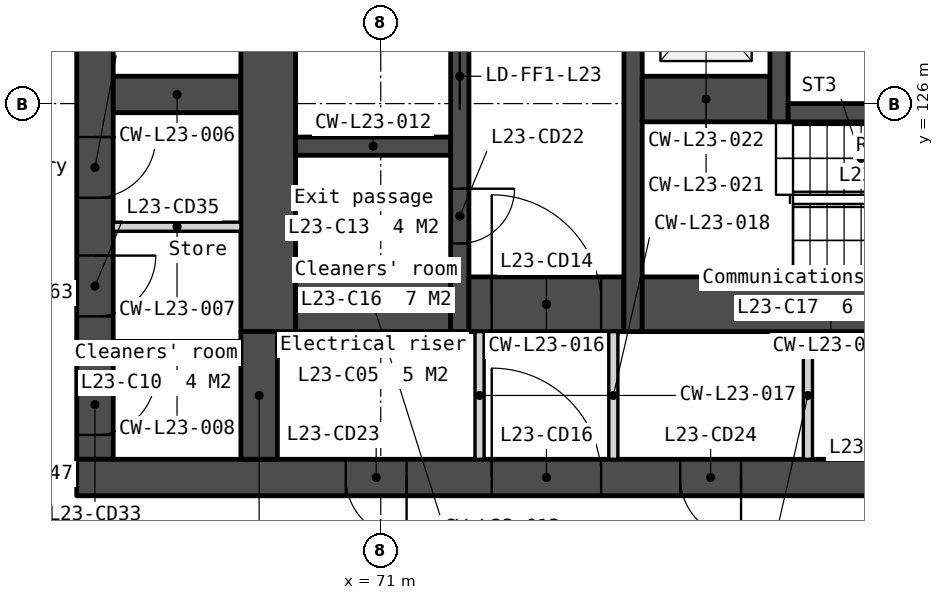
"""IFC4 building model, lengths in metres.
Left out: names, types, materials, properties, quantities, classifications, styles, units other than length and angle.
Written with IfcOpenShell. Run it as: python <this file> out.ifc"""

import sys

from ifc_helpers import new_model, si_unit, direction, frame, frame_2d, origin, place, context, subcontext, project, spatial, polyline, rectangle, outline, extrude, element, fill, save


model = new_model("IFC4")
c1 = context("Model", 3, precision=1e-05, world=origin(), true_north=direction((0.0, 1.0)))
c2 = subcontext(c1, "Body", "Model", "MODEL_VIEW")
j1 = project(units=[si_unit("LENGTHUNIT", "METRE"), si_unit("PLANEANGLEUNIT", "RADIAN")], contexts=[c1])
p1 = place(None, origin())
s1 = spatial("IfcSite", under=j1, at=p1, CompositionType="ELEMENT")
p2 = place(p1, origin())
s2 = spatial("IfcBuilding", under=s1, at=p2, CompositionType="ELEMENT")
p3 = place(p2, frame((0.0, 0.0, 95.8)))
s3 = spatial("IfcBuildingStorey", under=s2, at=p3, CompositionType="ELEMENT", Elevation=95.8)
p4 = place(p3, frame((66.3, 133.95, 0.0), z_axis=(0.0, 0.0, 1.0), x_axis=(0.0, -1.0, 0.0)))
e1 = element("IfcWall", 1, at=p4, inside=s3, PredefinedType="SOLIDWALL", context=c2, shape_type="SweptSolid", body=[
    extrude(rectangle(XDim=13.8, YDim=0.6, at=frame_2d((6.9, 0.0))), origin(), (0.0, 0.0, 1.0), 3.35),
])
p5 = place(p4, frame((0.6, 0.0, 0.0)))
e2 = element("IfcOpeningElement", 2, at=p5, cuts=e1, PredefinedType="OPENING", context=c2, shape_type="SweptSolid", body=[
    extrude(rectangle(XDim=1.1, YDim=2.1, at=frame_2d((0.55, 1.05))), frame((0.0, 0.31, 0.0), z_axis=(0.0, -1.0, 0.0), x_axis=(1.0, 0.0, 0.0)), (0.0, 0.0, 1.0), 0.62),
])
p6 = place(p4, frame((12.4, 0.0, 0.0)))
e3 = element("IfcOpeningElement", 3, at=p6, cuts=e1, PredefinedType="OPENING", context=c2, shape_type="SweptSolid", body=[
    extrude(rectangle(XDim=1.0, YDim=2.1, at=frame_2d((0.5, 1.05))), frame((0.0, 0.31, 0.0), z_axis=(0.0, -1.0, 0.0), x_axis=(1.0, 0.0, 0.0)), (0.0, 0.0, 1.0), 0.62),
])
p7 = place(p4, frame((8.5, 0.0, 0.0)))
e4 = element("IfcOpeningElement", 4, at=p7, cuts=e1, PredefinedType="OPENING", context=c2, shape_type="SweptSolid", body=[
    extrude(rectangle(XDim=1.0, YDim=2.1, at=frame_2d((0.5, 1.05))), frame((0.0, 0.31, 0.0), z_axis=(0.0, -1.0, 0.0), x_axis=(1.0, 0.0, 0.0)), (0.0, 0.0, 1.0), 0.62),
])
p8 = place(p4, frame((10.45, 0.0, 0.0)))
e5 = element("IfcOpeningElement", 5, at=p8, cuts=e1, PredefinedType="OPENING", context=c2, shape_type="SweptSolid", body=[
    extrude(rectangle(XDim=1.0, YDim=2.1, at=frame_2d((0.5, 1.05))), frame((0.0, 0.31, 0.0), z_axis=(0.0, -1.0, 0.0), x_axis=(1.0, 0.0, 0.0)), (0.0, 0.0, 1.0), 0.62),
])
p9 = place(p3, frame((66.0, 119.85, 0.0), z_axis=(0.0, 0.0, 1.0), x_axis=(1.0, 0.0, 0.0)))
e6 = element("IfcWall", 6, at=p9, inside=s3, PredefinedType="SOLIDWALL", context=c2, shape_type="SweptSolid", body=[
    extrude(rectangle(XDim=28.0, YDim=0.6, at=frame_2d((14.0, 0.0))), origin(), (0.0, 0.0, 1.0), 3.35),
])
p10 = place(p9, frame((6.825, 0.0, 0.0)))
e7 = element("IfcOpeningElement", 7, at=p10, cuts=e6, PredefinedType="OPENING", context=c2, shape_type="SweptSolid", body=[
    extrude(rectangle(XDim=1.8, YDim=2.1, at=frame_2d((0.9, 1.05))), frame((0.0, 0.31, 0.0), z_axis=(0.0, -1.0, 0.0), x_axis=(1.0, 0.0, 0.0)), (0.0, 0.0, 1.0), 0.62),
])
p11 = place(p9, frame((15.85, 0.0, 0.0)))
e8 = element("IfcOpeningElement", 8, at=p11, cuts=e6, PredefinedType="OPENING", context=c2, shape_type="SweptSolid", body=[
    extrude(rectangle(XDim=1.5, YDim=2.1, at=frame_2d((0.75, 1.05))), frame((0.0, 0.31, 0.0), z_axis=(0.0, -1.0, 0.0), x_axis=(1.0, 0.0, 0.0)), (0.0, 0.0, 1.0), 0.62),
])
p12 = place(p9, frame((19.375, 0.0, 0.0)))
e9 = element("IfcOpeningElement", 9, at=p12, cuts=e6, PredefinedType="OPENING", context=c2, shape_type="SweptSolid", body=[
    extrude(rectangle(XDim=1.8, YDim=2.1, at=frame_2d((0.9, 1.05))), frame((0.0, 0.31, 0.0), z_axis=(0.0, -1.0, 0.0), x_axis=(1.0, 0.0, 0.0)), (0.0, 0.0, 1.0), 0.62),
])
p13 = place(p9, frame((4.425, 0.0, 0.0)))
e10 = element("IfcOpeningElement", 10, at=p13, cuts=e6, PredefinedType="OPENING", context=c2, shape_type="SweptSolid", body=[
    extrude(rectangle(XDim=1.0, YDim=2.1, at=frame_2d((0.5, 1.05))), frame((0.0, 0.31, 0.0), z_axis=(0.0, -1.0, 0.0), x_axis=(1.0, 0.0, 0.0)), (0.0, 0.0, 1.0), 0.62),
])
p14 = place(p9, frame((9.925, 0.0, 0.0)))
e11 = element("IfcOpeningElement", 11, at=p14, cuts=e6, PredefinedType="OPENING", context=c2, shape_type="SweptSolid", body=[
    extrude(rectangle(XDim=1.0, YDim=2.1, at=frame_2d((0.5, 1.05))), frame((0.0, 0.31, 0.0), z_axis=(0.0, -1.0, 0.0), x_axis=(1.0, 0.0, 0.0)), (0.0, 0.0, 1.0), 0.62),
])
p15 = place(p9, frame((13.125, 0.0, 0.0)))
e12 = element("IfcOpeningElement", 12, at=p15, cuts=e6, PredefinedType="OPENING", context=c2, shape_type="SweptSolid", body=[
    extrude(rectangle(XDim=1.0, YDim=2.1, at=frame_2d((0.5, 1.05))), frame((0.0, 0.31, 0.0), z_axis=(0.0, -1.0, 0.0), x_axis=(1.0, 0.0, 0.0)), (0.0, 0.0, 1.0), 0.62),
])
p16 = place(p9, frame((21.725, 0.0, 0.0)))
e13 = element("IfcOpeningElement", 13, at=p16, cuts=e6, PredefinedType="OPENING", context=c2, shape_type="SweptSolid", body=[
    extrude(rectangle(XDim=1.0, YDim=2.1, at=frame_2d((0.5, 1.05))), frame((0.0, 0.31, 0.0), z_axis=(0.0, -1.0, 0.0), x_axis=(1.0, 0.0, 0.0)), (0.0, 0.0, 1.0), 0.62),
])
p17 = place(p9, frame((23.425, 0.0, 0.0)))
e14 = element("IfcOpeningElement", 14, at=p17, cuts=e6, PredefinedType="OPENING", context=c2, shape_type="SweptSolid", body=[
    extrude(rectangle(XDim=1.0, YDim=2.1, at=frame_2d((0.5, 1.05))), frame((0.0, 0.31, 0.0), z_axis=(0.0, -1.0, 0.0), x_axis=(1.0, 0.0, 0.0)), (0.0, 0.0, 1.0), 0.62),
])
p18 = place(p3, frame((66.6, 126.15, 0.0), z_axis=(0.0, 0.0, 1.0), x_axis=(1.0, 0.0, 0.0)))
e15 = element("IfcWall", 15, at=p18, inside=s3, PredefinedType="SOLIDWALL", context=c2, shape_type="SweptSolid", body=[
    extrude(rectangle(XDim=2.1, YDim=0.6, at=frame_2d((1.05, 0.0))), origin(), (0.0, 0.0, 1.0), 3.35),
])
for number, where, z_axis, x_axis in (
    (16, (66.6, 123.975, 0.0), (0.0, 0.0, 1.0), (1.0, 0.0, 0.0)),
    (17, (66.6, 122.025, 0.0), (0.0, 0.0, 1.0), (1.0, 0.0, 0.0)),
):
    element("IfcWall", number, at=place(p3, frame(where, z_axis=z_axis, x_axis=x_axis)), inside=s3, PredefinedType="PARTITIONING", context=c2, shape_type="SweptSolid", body=[
        extrude(rectangle(XDim=2.1, YDim=0.15, at=frame_2d((1.05, 0.0))), origin(), (0.0, 0.0, 1.0), 3.35),
    ])
p19 = place(p3, frame((69.15, 133.95, 0.0), z_axis=(0.0, 0.0, 1.0), x_axis=(0.0, -1.0, 0.0)))
e18 = element("IfcWall", 18, at=p19, inside=s3, PredefinedType="SOLIDWALL", context=c2, shape_type="SweptSolid", body=[
    extrude(rectangle(XDim=11.7, YDim=0.9, at=frame_2d((5.85, 0.0))), origin(), (0.0, 0.0, 1.0), 3.35),
])
p20 = place(p3, frame((69.0, 122.25, 0.0), z_axis=(0.0, 0.0, 1.0), x_axis=(0.0, -1.0, 0.0)))
e19 = element("IfcWall", 19, at=p20, inside=s3, PredefinedType="SOLIDWALL", context=c2, shape_type="SweptSolid", body=[
    extrude(rectangle(XDim=2.1, YDim=0.6, at=frame_2d((1.05, 0.0))), origin(), (0.0, 0.0, 1.0), 3.35),
])
p21 = place(p3, frame((69.6, 125.3, 0.0), z_axis=(0.0, 0.0, 1.0), x_axis=(1.0, 0.0, 0.0)))
e20 = element("IfcWall", 20, at=p21, inside=s3, PredefinedType="SOLIDWALL", context=c2, shape_type="SweptSolid", body=[
    extrude(rectangle(XDim=2.55, YDim=0.3, at=frame_2d((1.275, 0.0))), origin(), (0.0, 0.0, 1.0), 3.35),
])
p22 = place(p3, frame((69.6, 122.7, 0.0), z_axis=(0.0, 0.0, 1.0), x_axis=(1.0, 0.0, 0.0)))
e21 = element("IfcWall", 21, at=p22, inside=s3, PredefinedType="SOLIDWALL", context=c2, shape_type="SweptSolid", body=[
    extrude(rectangle(XDim=2.55, YDim=0.9, at=frame_2d((1.275, 0.0))), origin(), (0.0, 0.0, 1.0), 3.35),
])
p23 = place(p3, frame((72.3, 133.95, 0.0), z_axis=(0.0, 0.0, 1.0), x_axis=(0.0, -1.0, 0.0)))
e22 = element("IfcWall", 22, at=p23, inside=s3, PredefinedType="SOLIDWALL", context=c2, shape_type="SweptSolid", body=[
    extrude(rectangle(XDim=11.7, YDim=0.3, at=frame_2d((5.85, 0.0))), origin(), (0.0, 0.0, 1.0), 3.35),
])
p24 = place(p23, frame((6.95, 0.0, 0.0)))
e23 = element("IfcOpeningElement", 23, at=p24, cuts=e22, PredefinedType="OPENING", context=c2, shape_type="SweptSolid", body=[
    extrude(rectangle(XDim=1.1, YDim=2.1, at=frame_2d((0.55, 1.05))), frame((0.0, 0.16, 0.0), z_axis=(0.0, -1.0, 0.0), x_axis=(1.0, 0.0, 0.0)), (0.0, 0.0, 1.0), 0.32),
])
p25 = place(p23, frame((9.35, 0.0, 0.0)))
e24 = element("IfcOpeningElement", 24, at=p25, cuts=e22, PredefinedType="OPENING", context=c2, shape_type="SweptSolid", body=[
    extrude(rectangle(XDim=0.9, YDim=2.1, at=frame_2d((0.45, 1.05))), frame((0.0, 0.16, 0.0), z_axis=(0.0, -1.0, 0.0), x_axis=(1.0, 0.0, 0.0)), (0.0, 0.0, 1.0), 0.32),
])
p26 = place(p23, frame((5.1, 0.0, 0.0)))
e25 = element("IfcOpeningElement", 25, at=p26, cuts=e22, PredefinedType="OPENING", context=c2, shape_type="SweptSolid", body=[
    extrude(rectangle(XDim=1.0, YDim=2.1, at=frame_2d((0.5, 1.05))), frame((0.0, 0.16, 0.0), z_axis=(0.0, -1.0, 0.0), x_axis=(1.0, 0.0, 0.0)), (0.0, 0.0, 1.0), 0.32),
])
p27 = place(p3, frame((72.45, 122.7, 0.0), z_axis=(0.0, 0.0, 1.0), x_axis=(1.0, 0.0, 0.0)))
e26 = element("IfcWall", 26, at=p27, inside=s3, PredefinedType="SOLIDWALL", context=c2, shape_type="SweptSolid", body=[
    extrude(rectangle(XDim=2.55, YDim=0.9, at=frame_2d((1.275, 0.0))), origin(), (0.0, 0.0, 1.0), 3.35),
])
p28 = place(p27, frame((0.375, 0.0, 0.0)))
e27 = element("IfcOpeningElement", 27, at=p28, cuts=e26, PredefinedType="OPENING", context=c2, shape_type="SweptSolid", body=[
    extrude(rectangle(XDim=1.8, YDim=2.1, at=frame_2d((0.9, 1.05))), frame((0.0, 0.46, 0.0), z_axis=(0.0, -1.0, 0.0), x_axis=(1.0, 0.0, 0.0)), (0.0, 0.0, 1.0), 0.92),
])
for number, where, z_axis, x_axis in (
    (28, (72.625, 122.25, 0.0), (0.0, 0.0, 1.0), (0.0, -1.0, 0.0)),
    (29, (74.825, 122.25, 0.0), (0.0, 0.0, 1.0), (0.0, -1.0, 0.0)),
):
    element("IfcWall", number, at=place(p3, frame(where, z_axis=z_axis, x_axis=x_axis)), inside=s3, PredefinedType="PARTITIONING", context=c2, shape_type="SweptSolid", body=[
        extrude(rectangle(XDim=2.1, YDim=0.15, at=frame_2d((1.05, 0.0))), origin(), (0.0, 0.0, 1.0), 3.35),
    ])
p29 = place(p3, frame((75.15, 133.95, 0.0), z_axis=(0.0, 0.0, 1.0), x_axis=(0.0, -1.0, 0.0)))
e30 = element("IfcWall", 30, at=p29, inside=s3, PredefinedType="SOLIDWALL", context=c2, shape_type="SweptSolid", body=[
    extrude(rectangle(XDim=11.7, YDim=0.3, at=frame_2d((5.85, 0.0))), origin(), (0.0, 0.0, 1.0), 3.35),
])
p30 = place(p3, frame((75.3, 126.075, 0.0), z_axis=(0.0, 0.0, 1.0), x_axis=(1.0, 0.0, 0.0)))
e31 = element("IfcWall", 31, at=p30, inside=s3, PredefinedType="SOLIDWALL", context=c2, shape_type="SweptSolid", body=[
    extrude(rectangle(XDim=2.1, YDim=0.75, at=frame_2d((1.05, 0.0))), origin(), (0.0, 0.0, 1.0), 3.35),
])
p31 = place(p3, frame((75.3, 122.7, 0.0), z_axis=(0.0, 0.0, 1.0), x_axis=(1.0, 0.0, 0.0)))
e32 = element("IfcWall", 32, at=p31, inside=s3, PredefinedType="SOLIDWALL", context=c2, shape_type="SweptSolid", body=[
    extrude(rectangle(XDim=6.2, YDim=0.9, at=frame_2d((3.1, 0.0))), origin(), (0.0, 0.0, 1.0), 3.35),
])
p32 = place(p3, frame((77.55, 133.95, 0.0), z_axis=(0.0, 0.0, 1.0), x_axis=(0.0, -1.0, 0.0)))
e33 = element("IfcWall", 33, at=p32, inside=s3, PredefinedType="SOLIDWALL", context=c2, shape_type="SweptSolid", body=[
    extrude(rectangle(XDim=8.25, YDim=0.3, at=frame_2d((4.125, 0.0))), origin(), (0.0, 0.0, 1.0), 3.35),
])
p33 = place(p32, frame((0.6, 0.0, 0.0)))
e34 = element("IfcOpeningElement", 34, at=p33, cuts=e33, PredefinedType="OPENING", context=c2, shape_type="SweptSolid", body=[
    extrude(rectangle(XDim=1.1, YDim=2.1, at=frame_2d((0.55, 1.05))), frame((0.0, 0.16, 0.0), z_axis=(0.0, -1.0, 0.0), x_axis=(1.0, 0.0, 0.0)), (0.0, 0.0, 1.0), 0.32),
])
p34 = place(p32, frame((3.2, 0.0, 0.0)))
e35 = element("IfcOpeningElement", 35, at=p34, cuts=e33, PredefinedType="OPENING", context=c2, shape_type="SweptSolid", body=[
    extrude(rectangle(XDim=1.1, YDim=2.1, at=frame_2d((0.55, 1.05))), frame((0.0, 0.16, 0.0), z_axis=(0.0, -1.0, 0.0), x_axis=(1.0, 0.0, 0.0)), (0.0, 0.0, 1.0), 0.32),
])
p35 = place(p32, frame((5.8, 0.0, 0.0)))
e36 = element("IfcOpeningElement", 36, at=p35, cuts=e33, PredefinedType="OPENING", context=c2, shape_type="SweptSolid", body=[
    extrude(rectangle(XDim=1.1, YDim=2.1, at=frame_2d((0.55, 1.05))), frame((0.0, 0.16, 0.0), z_axis=(0.0, -1.0, 0.0), x_axis=(1.0, 0.0, 0.0)), (0.0, 0.0, 1.0), 0.32),
])
p36 = place(p3, frame((77.7, 125.85, 0.0), z_axis=(0.0, 0.0, 1.0), x_axis=(1.0, 0.0, 0.0)))
e37 = element("IfcWall", 37, at=p36, inside=s3, PredefinedType="SOLIDWALL", context=c2, shape_type="SweptSolid", body=[
    extrude(rectangle(XDim=4.6, YDim=0.3, at=frame_2d((2.3, 0.0))), origin(), (0.0, 0.0, 1.0), 3.35),
])
p37 = place(p3, frame((78.025, 122.25, 0.0), z_axis=(0.0, 0.0, 1.0), x_axis=(0.0, -1.0, 0.0)))
e38 = element("IfcWall", 38, at=p37, inside=s3, PredefinedType="PARTITIONING", context=c2, shape_type="SweptSolid", body=[
    extrude(rectangle(XDim=2.1, YDim=0.15, at=frame_2d((1.05, 0.0))), origin(), (0.0, 0.0, 1.0), 3.35),
])
p38 = place(p3, frame((56.073, 130.263, -0.15), z_axis=(0.0, 0.0, 1.0), x_axis=(0.500000478905, -0.866025127289, 0.0)))
e39 = element("IfcWall", 39, at=p38, inside=s3, PredefinedType="SOLIDWALL", context=c2, shape_type="SweptSolid", body=[
    extrude(outline(polyline([(42.643, 0.0), (42.643, 3.5), (0.0, 3.5), (0.0, 0.0), (42.643, 0.0)])), frame((0.0, 0.225, 0.0), z_axis=(0.0, -1.0, 0.0), x_axis=(1.0, 0.0, 0.0)), (0.0, 0.0, 1.0), 0.45),
])
p39 = place(p38, frame((2.814, 0.0, 1.05)))
e40 = element("IfcOpeningElement", 40, at=p39, cuts=e39, PredefinedType="OPENING", context=c2, shape_type="SweptSolid", body=[
    extrude(rectangle(XDim=1.2, YDim=1.5, at=frame_2d((0.6, 0.75))), frame((0.0, 0.235, 0.0), z_axis=(0.0, -1.0, 0.0), x_axis=(1.0, 0.0, 0.0)), (0.0, 0.0, 1.0), 0.47),
])
p40 = place(p38, frame((4.514, 0.0, 1.05)))
e41 = element("IfcOpeningElement", 41, at=p40, cuts=e39, PredefinedType="OPENING", context=c2, shape_type="SweptSolid", body=[
    extrude(rectangle(XDim=1.2, YDim=1.5, at=frame_2d((0.6, 0.75))), frame((0.0, 0.235, 0.0), z_axis=(0.0, -1.0, 0.0), x_axis=(1.0, 0.0, 0.0)), (0.0, 0.0, 1.0), 0.47),
])
p41 = place(p38, frame((11.343, 0.0, 1.05)))
e42 = element("IfcOpeningElement", 42, at=p41, cuts=e39, PredefinedType="OPENING", context=c2, shape_type="SweptSolid", body=[
    extrude(rectangle(XDim=1.2, YDim=1.5, at=frame_2d((0.6, 0.75))), frame((0.0, 0.235, 0.0), z_axis=(0.0, -1.0, 0.0), x_axis=(1.0, 0.0, 0.0)), (0.0, 0.0, 1.0), 0.47),
])
p42 = place(p38, frame((13.043, 0.0, 1.05)))
e43 = element("IfcOpeningElement", 43, at=p42, cuts=e39, PredefinedType="OPENING", context=c2, shape_type="SweptSolid", body=[
    extrude(rectangle(XDim=1.2, YDim=1.5, at=frame_2d((0.6, 0.75))), frame((0.0, 0.235, 0.0), z_axis=(0.0, -1.0, 0.0), x_axis=(1.0, 0.0, 0.0)), (0.0, 0.0, 1.0), 0.47),
])
p43 = place(p38, frame((19.872, 0.0, 1.05)))
e44 = element("IfcOpeningElement", 44, at=p43, cuts=e39, PredefinedType="OPENING", context=c2, shape_type="SweptSolid", body=[
    extrude(rectangle(XDim=1.2, YDim=1.5, at=frame_2d((0.6, 0.75))), frame((0.0, 0.235, 0.0), z_axis=(0.0, -1.0, 0.0), x_axis=(1.0, 0.0, 0.0)), (0.0, 0.0, 1.0), 0.47),
])
p44 = place(p38, frame((21.572, 0.0, 1.05)))
e45 = element("IfcOpeningElement", 45, at=p44, cuts=e39, PredefinedType="OPENING", context=c2, shape_type="SweptSolid", body=[
    extrude(rectangle(XDim=1.2, YDim=1.5, at=frame_2d((0.6, 0.75))), frame((0.0, 0.235, 0.0), z_axis=(0.0, -1.0, 0.0), x_axis=(1.0, 0.0, 0.0)), (0.0, 0.0, 1.0), 0.47),
])
p45 = place(p38, frame((28.4, 0.0, 1.05)))
e46 = element("IfcOpeningElement", 46, at=p45, cuts=e39, PredefinedType="OPENING", context=c2, shape_type="SweptSolid", body=[
    extrude(rectangle(XDim=1.2, YDim=1.5, at=frame_2d((0.6, 0.75))), frame((0.0, 0.235, 0.0), z_axis=(0.0, -1.0, 0.0), x_axis=(1.0, 0.0, 0.0)), (0.0, 0.0, 1.0), 0.47),
])
p46 = place(p38, frame((30.1, 0.0, 1.05)))
e47 = element("IfcOpeningElement", 47, at=p46, cuts=e39, PredefinedType="OPENING", context=c2, shape_type="SweptSolid", body=[
    extrude(rectangle(XDim=1.2, YDim=1.5, at=frame_2d((0.6, 0.75))), frame((0.0, 0.235, 0.0), z_axis=(0.0, -1.0, 0.0), x_axis=(1.0, 0.0, 0.0)), (0.0, 0.0, 1.0), 0.47),
])
p47 = place(p38, frame((36.929, 0.0, 1.05)))
e48 = element("IfcOpeningElement", 48, at=p47, cuts=e39, PredefinedType="OPENING", context=c2, shape_type="SweptSolid", body=[
    extrude(rectangle(XDim=1.2, YDim=1.5, at=frame_2d((0.6, 0.75))), frame((0.0, 0.235, 0.0), z_axis=(0.0, -1.0, 0.0), x_axis=(1.0, 0.0, 0.0)), (0.0, 0.0, 1.0), 0.47),
])
p48 = place(p38, frame((38.629, 0.0, 1.05)))
e49 = element("IfcOpeningElement", 49, at=p48, cuts=e39, PredefinedType="OPENING", context=c2, shape_type="SweptSolid", body=[
    extrude(rectangle(XDim=1.2, YDim=1.5, at=frame_2d((0.6, 0.75))), frame((0.0, 0.235, 0.0), z_axis=(0.0, -1.0, 0.0), x_axis=(1.0, 0.0, 0.0)), (0.0, 0.0, 1.0), 0.47),
])
p49 = place(p24, origin())
e50 = element("IfcDoor", 50, at=p49, inside=s3, OperationType="SLIDING_TO_LEFT", PredefinedType="DOOR", context=c2, shape_type="SweptSolid", body=[
    extrude(rectangle(XDim=1.1, YDim=2.1, at=frame_2d((0.55, 1.05))), frame((0.0, 0.025, 0.0), z_axis=(0.0, -1.0, 0.0), x_axis=(1.0, 0.0, 0.0)), (0.0, 0.0, 1.0), 0.05),
])
fill(e23, e50)
p50 = place(p28, origin())
e51 = element("IfcDoor", 51, at=p50, inside=s3, OperationType="DOUBLE_DOOR_DOUBLE_SWING", PredefinedType="DOOR", context=c2, shape_type="SweptSolid", body=[
    extrude(rectangle(XDim=1.8, YDim=2.1, at=frame_2d((0.9, 1.05))), frame((0.0, 0.025, 0.0), z_axis=(0.0, -1.0, 0.0), x_axis=(1.0, 0.0, 0.0)), (0.0, 0.0, 1.0), 0.05),
])
fill(e27, e51)
p51 = place(p10, origin())
e52 = element("IfcDoor", 52, at=p51, inside=s3, OperationType="DOUBLE_DOOR_DOUBLE_SWING", PredefinedType="DOOR", context=c2, shape_type="SweptSolid", body=[
    extrude(rectangle(XDim=1.8, YDim=2.1, at=frame_2d((0.9, 1.05))), frame((0.0, 0.025, 0.0), z_axis=(0.0, -1.0, 0.0), x_axis=(1.0, 0.0, 0.0)), (0.0, 0.0, 1.0), 0.05),
])
fill(e7, e52)
p52 = place(p25, origin())
e53 = element("IfcDoor", 53, at=p52, inside=s3, OperationType="SINGLE_SWING_LEFT", PredefinedType="DOOR", context=c2, shape_type="SweptSolid", body=[
    extrude(rectangle(XDim=0.9, YDim=2.1, at=frame_2d((0.45, 1.05))), frame((0.0, 0.025, 0.0), z_axis=(0.0, -1.0, 0.0), x_axis=(1.0, 0.0, 0.0)), (0.0, 0.0, 1.0), 0.05),
])
fill(e24, e53)
p53 = place(p13, origin())
e54 = element("IfcDoor", 54, at=p53, inside=s3, OperationType="SINGLE_SWING_RIGHT", PredefinedType="DOOR", context=c2, shape_type="SweptSolid", body=[
    extrude(rectangle(XDim=1.0, YDim=2.1, at=frame_2d((0.5, 1.05))), frame((0.0, 0.025, 0.0), z_axis=(0.0, -1.0, 0.0), x_axis=(1.0, 0.0, 0.0)), (0.0, 0.0, 1.0), 0.05),
])
fill(e10, e54)
p54 = place(p14, origin())
e55 = element("IfcDoor", 55, at=p54, inside=s3, OperationType="SINGLE_SWING_RIGHT", PredefinedType="DOOR", context=c2, shape_type="SweptSolid", body=[
    extrude(rectangle(XDim=1.0, YDim=2.1, at=frame_2d((0.5, 1.05))), frame((0.0, 0.025, 0.0), z_axis=(0.0, -1.0, 0.0), x_axis=(1.0, 0.0, 0.0)), (0.0, 0.0, 1.0), 0.05),
])
fill(e11, e55)
p55 = place(p6, origin())
e56 = element("IfcDoor", 56, at=p55, inside=s3, OperationType="SINGLE_SWING_LEFT", PredefinedType="DOOR", context=c2, shape_type="SweptSolid", body=[
    extrude(rectangle(XDim=1.0, YDim=2.1, at=frame_2d((0.5, 1.05))), frame((0.0, 0.025, 0.0), z_axis=(0.0, -1.0, 0.0), x_axis=(1.0, 0.0, 0.0)), (0.0, 0.0, 1.0), 0.05),
])
fill(e3, e56)
p56 = place(p7, origin())
e57 = element("IfcDoor", 57, at=p56, inside=s3, OperationType="SINGLE_SWING_LEFT", PredefinedType="DOOR", context=c2, shape_type="SweptSolid", body=[
    extrude(rectangle(XDim=1.0, YDim=2.1, at=frame_2d((0.5, 1.05))), frame((0.0, 0.025, 0.0), z_axis=(0.0, -1.0, 0.0), x_axis=(1.0, 0.0, 0.0)), (0.0, 0.0, 1.0), 0.05),
])
fill(e4, e57)
p57 = place(p8, origin())
e58 = element("IfcDoor", 58, at=p57, inside=s3, OperationType="SINGLE_SWING_LEFT", PredefinedType="DOOR", context=c2, shape_type="SweptSolid", body=[
    extrude(rectangle(XDim=1.0, YDim=2.1, at=frame_2d((0.5, 1.05))), frame((0.0, 0.025, 0.0), z_axis=(0.0, -1.0, 0.0), x_axis=(1.0, 0.0, 0.0)), (0.0, 0.0, 1.0), 0.05),
])
fill(e5, e58)
save(model, sys.argv[1])
